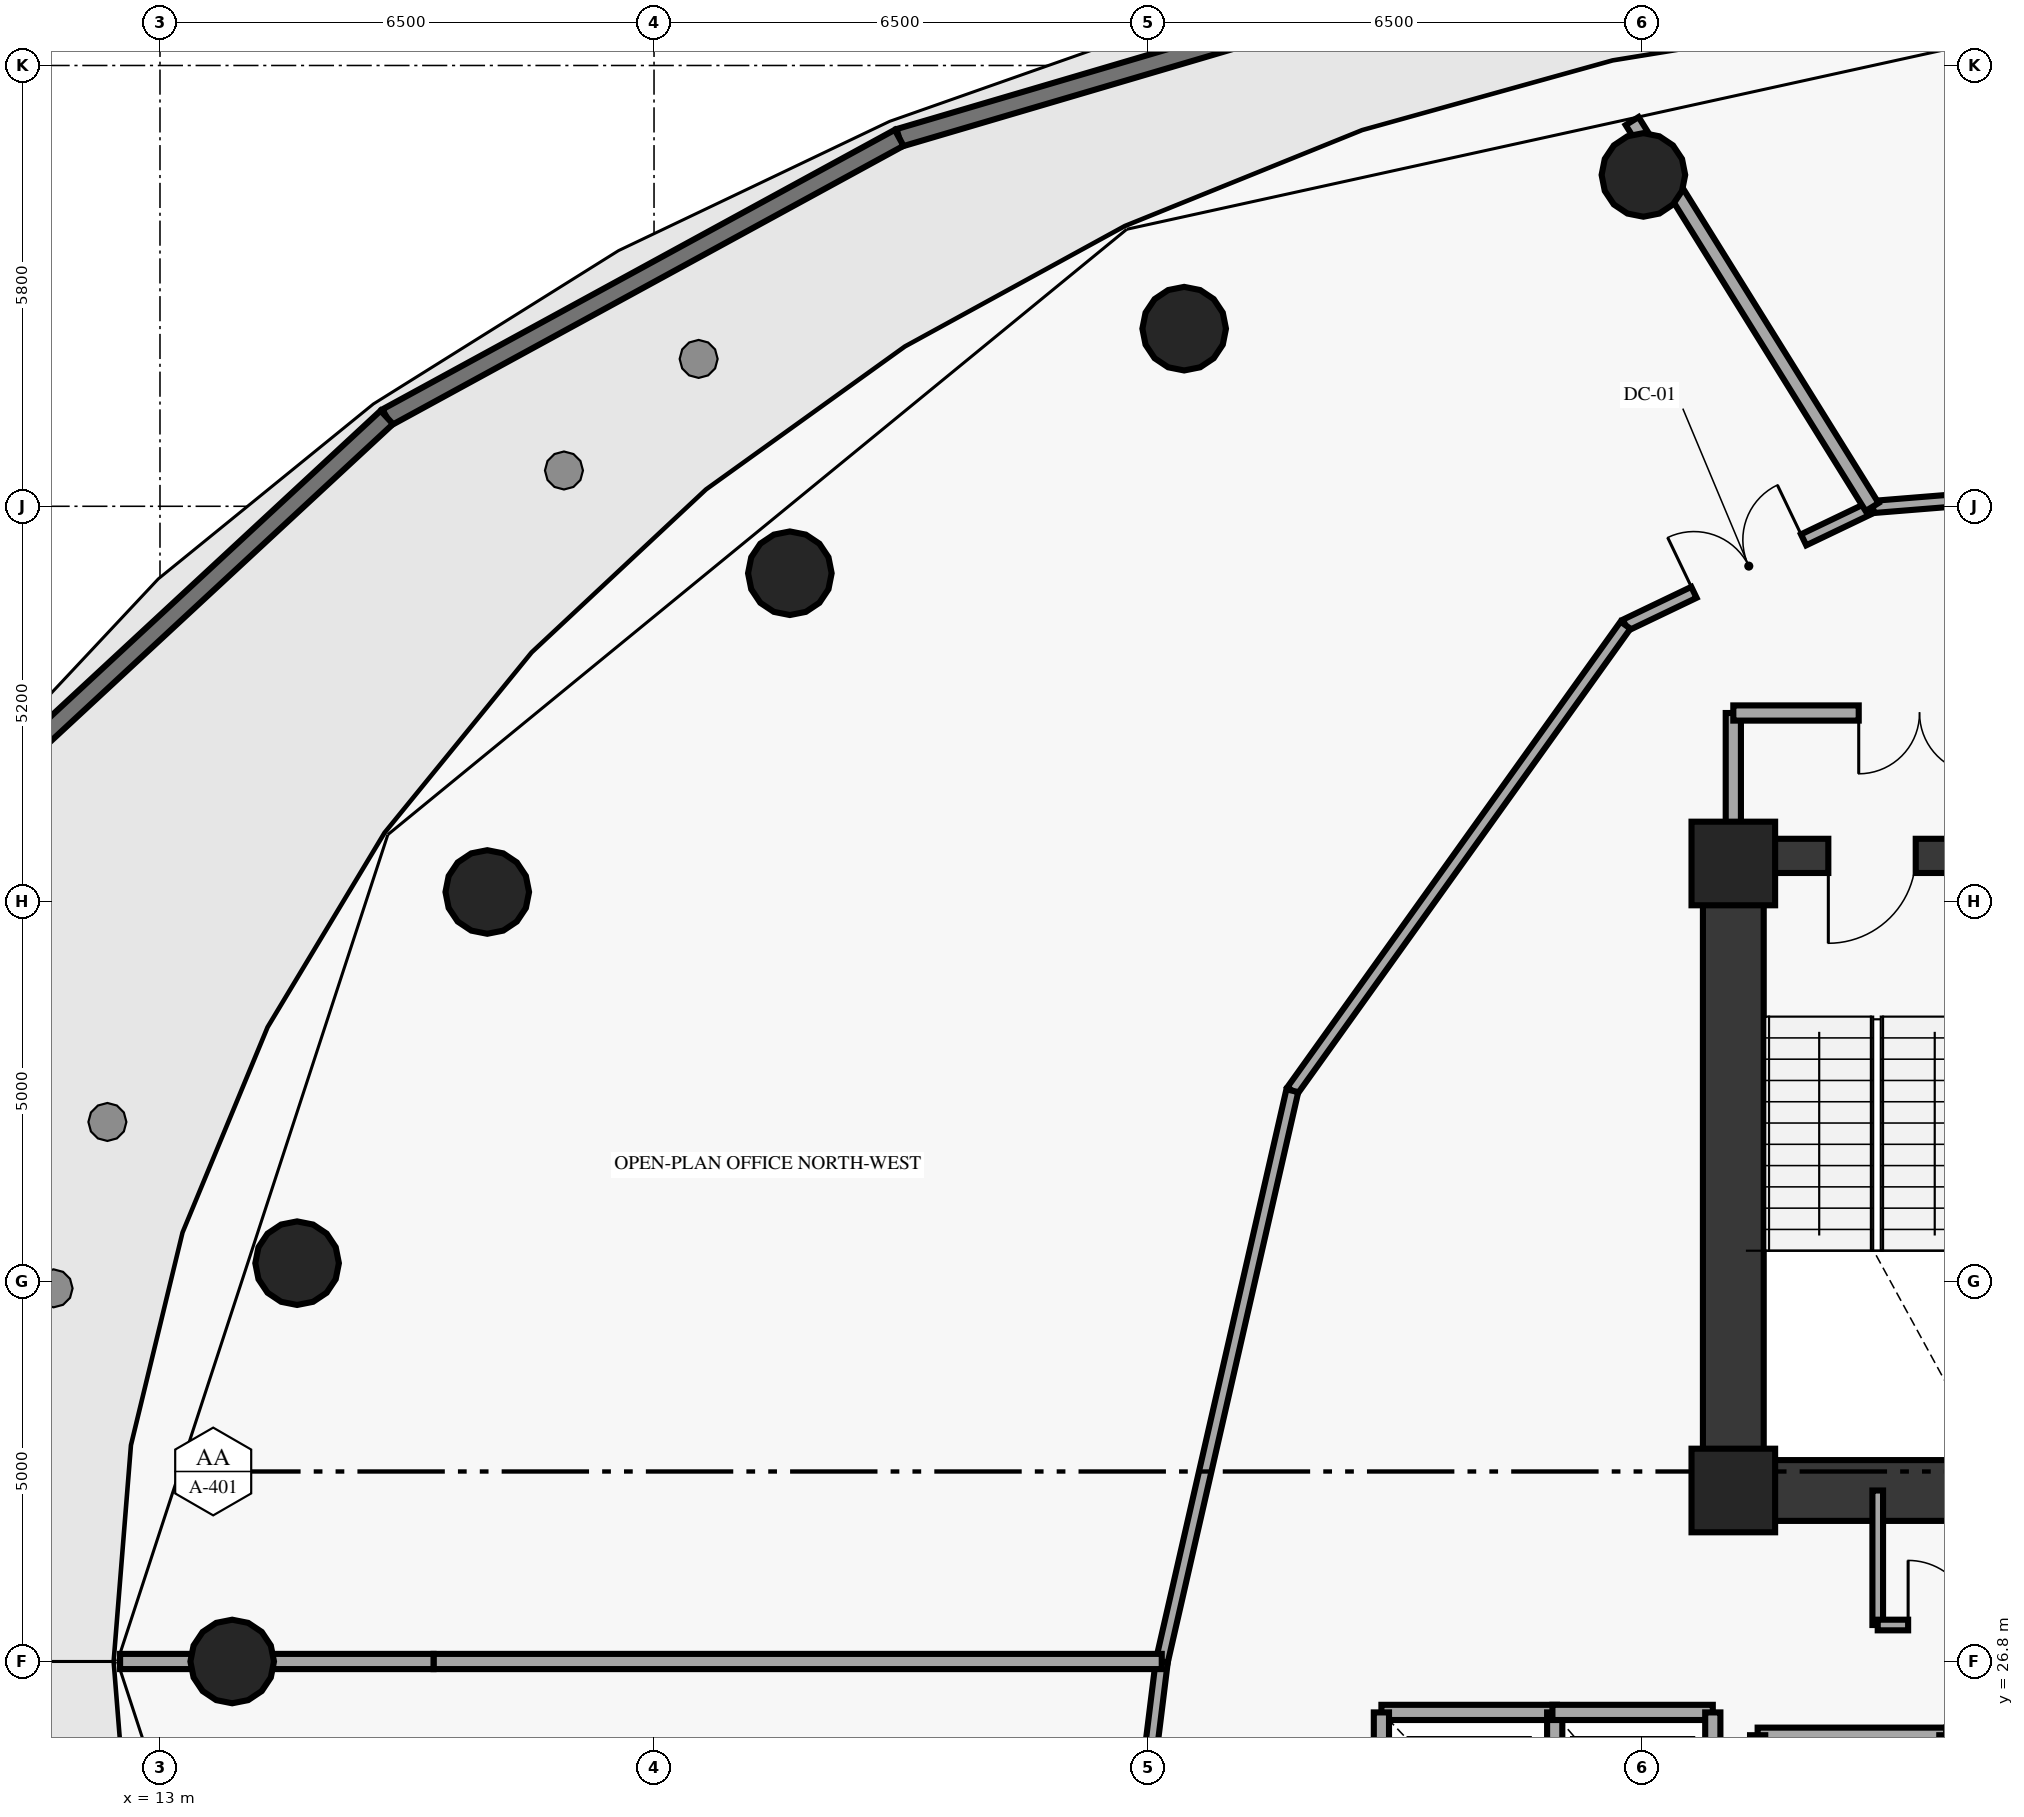
"""IFC4 building model, lengths in metres.
Left out: names, types, materials, properties, quantities, classifications, styles, units other than length and angle.
Written with IfcOpenShell. Run it as: python <this file> out.ifc"""

import sys

from ifc_helpers import new_model, si_unit, direction, frame, frame_2d, origin, origin_2d, place, context, subcontext, project, spatial, rectangle, circle, extrude, element, fill, save


model = new_model("IFC4")
c1 = context("Model", 3, precision=1e-05, world=origin(), true_north=direction((0.0, 1.0)))
c2 = subcontext(c1, "Body", "Model", "MODEL_VIEW")
j1 = project(units=[si_unit("LENGTHUNIT", "METRE"), si_unit("PLANEANGLEUNIT", "RADIAN")], contexts=[c1])
p1 = place(None, origin())
s1 = spatial("IfcSite", under=j1, at=p1, CompositionType="ELEMENT")
p2 = place(p1, origin())
s2 = spatial("IfcBuilding", under=s1, at=p2, CompositionType="ELEMENT")
p3 = place(p2, frame((0.0, 0.0, 21.0)))
s3 = spatial("IfcBuildingStorey", under=s2, at=p3, CompositionType="ELEMENT", Elevation=21.0)
for number, where, z_axis, x_axis in (
    (1, (33.7, 37.3, 0.0), (0.0, 0.0, 1.0), (1.0, 0.0, 0.0)),
    (2, (33.7, 29.05, 0.0), (0.0, 0.0, 1.0), (1.0, 0.0, 0.0)),
):
    element("IfcColumn", number, at=place(p3, frame(where, z_axis=z_axis, x_axis=x_axis)), inside=s3, PredefinedType="PILASTER", context=c2, shape_type="SweptSolid", body=[
        extrude(rectangle(XDim=1.1, YDim=1.1, at=origin_2d()), origin(), (0.0, 0.0, 1.0), 3.79),
    ])
for number, where, z_axis, x_axis in (
    (3, (32.517, 46.36, -0.26), (0.0, 0.0, 1.0), (1.0, 0.0, 0.0)),
    (4, (26.475, 44.337, -0.26), (0.0, 0.0, 1.0), (1.0, 0.0, 0.0)),
):
    element("IfcColumn", number, at=place(p3, frame(where, z_axis=z_axis, x_axis=x_axis)), inside=s3, PredefinedType="COLUMN", context=c2, shape_type="SweptSolid", body=[
        extrude(circle(Radius=0.55, at=origin_2d()), origin(), (0.0, 0.0, 1.0), 4.05),
    ])
p4 = place(p3, frame((21.287, 41.119, 0.0), z_axis=(0.0, 0.0, 1.0), x_axis=(1.0, 0.0, 0.0)))
e5 = element("IfcColumn", 5, at=p4, inside=s3, PredefinedType="COLUMN", context=c2, shape_type="SweptSolid", body=[
    extrude(circle(Radius=0.55, at=origin_2d()), origin(), (0.0, 0.0, 1.0), 3.79),
])
for number, where, z_axis, x_axis in (
    (6, (17.306, 36.925, -0.26), (0.0, 0.0, 1.0), (1.0, 0.0, 0.0)),
    (7, (14.804, 32.041, -0.26), (0.0, 0.0, 1.0), (1.0, 0.0, 0.0)),
):
    element("IfcColumn", number, at=place(p3, frame(where, z_axis=z_axis, x_axis=x_axis)), inside=s3, PredefinedType="COLUMN", context=c2, shape_type="SweptSolid", body=[
        extrude(circle(Radius=0.55, at=origin_2d()), origin(), (0.0, 0.0, 1.0), 4.05),
    ])
p5 = place(p3, frame((13.95, 26.8, 0.0), z_axis=(0.0, 0.0, 1.0), x_axis=(1.0, 0.0, 0.0)))
e8 = element("IfcColumn", 8, at=p5, inside=s3, PredefinedType="COLUMN", context=c2, shape_type="SweptSolid", body=[
    extrude(circle(Radius=0.55, at=origin_2d()), origin(), (0.0, 0.0, 1.0), 3.79),
])
p6 = place(p3, frame((33.7, 29.05, 0.0), z_axis=(0.0, 0.0, 1.0), x_axis=(0.0, 1.0, 0.0)))
e9 = element("IfcWall", 9, at=p6, inside=s3, PredefinedType="SHEAR", context=c2, shape_type="SweptSolid", body=[
    extrude(rectangle(XDim=8.35, YDim=0.8, at=frame_2d((4.175, 0.0))), origin(), (0.0, 0.0, 1.0), 3.79),
])
p7 = place(p3, frame((33.7, 29.05, 0.0), z_axis=(0.0, 0.0, 1.0), x_axis=(1.0, 0.0, 0.0)))
e10 = element("IfcWall", 10, at=p7, inside=s3, PredefinedType="SHEAR", context=c2, shape_type="SweptSolid", body=[
    extrude(rectangle(XDim=10.6, YDim=0.8, at=frame_2d((5.3, 0.0))), origin(), (0.0, 0.0, 1.0), 3.79),
])
p8 = place(p3, frame((30.575, 49.161, 0.0), z_axis=(0.0, 0.0, 1.0), x_axis=(-0.959226195017, -0.282639535085, 0.0)))
e11 = element("IfcWall", 11, at=p8, inside=s3, PredefinedType="PARAPET", context=c2, shape_type="SweptSolid", body=[
    extrude(rectangle(XDim=8.184, YDim=0.24, at=frame_2d((4.092, 0.0))), origin(), (0.0, 0.0, 1.0), 1.15),
])
p9 = place(p3, frame((22.725, 46.848, 0.0), z_axis=(0.0, 0.0, 1.0), x_axis=(-0.877843323355, -0.47894790911, 0.0)))
e12 = element("IfcWall", 12, at=p9, inside=s3, PredefinedType="PARAPET", context=c2, shape_type="SweptSolid", body=[
    extrude(rectangle(XDim=7.679, YDim=0.24, at=frame_2d((3.84, 0.0))), origin(), (0.0, 0.0, 1.0), 1.15),
])
p10 = place(p3, frame((15.984, 43.17, 0.0), z_axis=(0.0, 0.0, 1.0), x_axis=(-0.733389888961, -0.679808260298, 0.0)))
e13 = element("IfcWall", 13, at=p10, inside=s3, PredefinedType="PARAPET", context=c2, shape_type="SweptSolid", body=[
    extrude(rectangle(XDim=7.053, YDim=0.24, at=frame_2d((3.527, 0.0))), origin(), (0.0, 0.0, 1.0), 1.15),
])
p11 = place(p3, frame((37.35, 37.4, 0.0), z_axis=(0.0, 0.0, 1.0), x_axis=(-1.0, 0.0, 0.0)))
e14 = element("IfcWall", 14, at=p11, inside=s3, PredefinedType="SHEAR", context=c2, shape_type="SweptSolid", body=[
    extrude(rectangle(XDim=3.65, YDim=0.45, at=frame_2d((1.825, 0.0))), origin(), (0.0, 0.0, 1.0), 3.79),
])
p12 = place(p11, frame((1.25, 0.0, 0.0)))
e15 = element("IfcOpeningElement", 15, at=p12, cuts=e14, PredefinedType="OPENING", context=c2, shape_type="SweptSolid", body=[
    extrude(rectangle(XDim=1.15, YDim=2.15, at=frame_2d((0.575, 1.075))), frame((0.0, 0.235, 0.0), z_axis=(0.0, -1.0, 0.0), x_axis=(1.0, 0.0, 0.0)), (0.0, 0.0, 1.0), 0.47),
])
p13 = place(p3, frame((33.7, 37.4, 0.0), z_axis=(0.0, 0.0, 1.0), x_axis=(0.0, 1.0, 0.0)))
e16 = element("IfcWall", 16, at=p13, inside=s3, PredefinedType="SOLIDWALL", context=c2, shape_type="SweptSolid", body=[
    extrude(rectangle(XDim=1.88, YDim=0.2, at=frame_2d((0.94, 0.0))), origin(), (0.0, 0.0, 1.0), 3.79),
])
p14 = place(p3, frame((38.9, 39.28, 0.0), z_axis=(0.0, 0.0, 1.0), x_axis=(-1.0, 0.0, 0.0)))
e17 = element("IfcWall", 17, at=p14, inside=s3, PredefinedType="SOLIDWALL", context=c2, shape_type="SweptSolid", body=[
    extrude(rectangle(XDim=5.2, YDim=0.2, at=frame_2d((2.6, 0.0))), origin(), (0.0, 0.0, 1.0), 3.79),
])
p15 = place(p14, frame((1.95, 0.0, 0.0)))
e18 = element("IfcOpeningElement", 18, at=p15, cuts=e17, PredefinedType="OPENING", context=c2, shape_type="SweptSolid", body=[
    extrude(rectangle(XDim=1.6, YDim=2.2, at=frame_2d((0.8, 1.1))), frame((0.0, 0.11, 0.0), z_axis=(0.0, -1.0, 0.0), x_axis=(1.0, 0.0, 0.0)), (0.0, 0.0, 1.0), 0.22),
])
p16 = place(p3, frame((35.6, 27.28, 0.0), z_axis=(0.0, 0.0, 1.0), x_axis=(0.0, 1.0, 0.0)))
e19 = element("IfcWall", 19, at=p16, inside=s3, PredefinedType="PARTITIONING", context=c2, shape_type="SweptSolid", body=[
    extrude(rectangle(XDim=1.77, YDim=0.14, at=frame_2d((0.885, 0.0))), origin(), (0.0, 0.0, 1.0), 3.79),
])
p17 = place(p3, frame((29.07, 26.13, 0.0), z_axis=(0.0, 0.0, 1.0), x_axis=(1.0, 0.0, 0.0)))
e20 = element("IfcWall", 20, at=p17, inside=s3, PredefinedType="SOLIDWALL", context=c2, shape_type="SweptSolid", body=[
    extrude(rectangle(XDim=2.31, YDim=0.2, at=frame_2d((1.155, 0.0))), origin(), (0.0, 0.0, 1.0), 3.79),
])
for number, where, z_axis, x_axis in (
    (21, (29.07, 23.72, 0.0), (0.0, 0.0, 1.0), (0.0, 1.0, 0.0)),
    (22, (31.35, 23.72, 0.0), (0.0, 0.0, 1.0), (0.0, 1.0, 0.0)),
):
    element("IfcWall", number, at=place(p3, frame(where, z_axis=z_axis, x_axis=x_axis)), inside=s3, PredefinedType="SOLIDWALL", context=c2, shape_type="SweptSolid", body=[
        extrude(rectangle(XDim=2.41, YDim=0.2, at=frame_2d((1.205, 0.0))), origin(), (0.0, 0.0, 1.0), 3.79),
    ])
p18 = place(p3, frame((31.32, 26.13, 0.0), z_axis=(0.0, 0.0, 1.0), x_axis=(1.0, 0.0, 0.0)))
e23 = element("IfcWall", 23, at=p18, inside=s3, PredefinedType="SOLIDWALL", context=c2, shape_type="SweptSolid", body=[
    extrude(rectangle(XDim=2.11, YDim=0.2, at=frame_2d((1.055, 0.0))), origin(), (0.0, 0.0, 1.0), 3.79),
])
p19 = place(p3, frame((33.43, 23.72, 0.0), z_axis=(0.0, 0.0, 1.0), x_axis=(0.0, 1.0, 0.0)))
e24 = element("IfcWall", 24, at=p19, inside=s3, PredefinedType="SOLIDWALL", context=c2, shape_type="SweptSolid", body=[
    extrude(rectangle(XDim=2.41, YDim=0.2, at=frame_2d((1.205, 0.0))), origin(), (0.0, 0.0, 1.0), 3.79),
])
p20 = place(p3, frame((34.02, 25.83, 0.0), z_axis=(0.0, 0.0, 1.0), x_axis=(1.0, 0.0, 0.0)))
e25 = element("IfcWall", 25, at=p20, inside=s3, PredefinedType="SOLIDWALL", context=c2, shape_type="SweptSolid", body=[
    extrude(rectangle(XDim=2.5, YDim=0.2, at=frame_2d((1.25, 0.0))), origin(), (0.0, 0.0, 1.0), 3.79),
])
for number, where, z_axis, x_axis in (
    (26, (34.02, 23.42, 0.0), (0.0, 0.0, 1.0), (0.0, 1.0, 0.0)),
    (27, (36.51, 23.42, 0.0), (0.0, 0.0, 1.0), (0.0, 1.0, 0.0)),
):
    element("IfcWall", number, at=place(p3, frame(where, z_axis=z_axis, x_axis=x_axis)), inside=s3, PredefinedType="SOLIDWALL", context=c2, shape_type="SweptSolid", body=[
        extrude(rectangle(XDim=2.41, YDim=0.2, at=frame_2d((1.205, 0.0))), origin(), (0.0, 0.0, 1.0), 3.79),
    ])
p21 = place(p3, frame((35.6, 27.28, 0.0), z_axis=(0.0, 0.0, 1.0), x_axis=(1.0, 0.0, 0.0)))
e28 = element("IfcWall", 28, at=p21, inside=s3, PredefinedType="PARTITIONING", context=c2, shape_type="SweptSolid", body=[
    extrude(rectangle(XDim=5.4, YDim=0.14, at=frame_2d((2.7, 0.0))), origin(), (0.0, 0.0, 1.0), 3.79),
])
p22 = place(p21, frame((0.4, 0.0, 0.0)))
e29 = element("IfcOpeningElement", 29, at=p22, cuts=e28, PredefinedType="OPENING", context=c2, shape_type="SweptSolid", body=[
    extrude(rectangle(XDim=0.85, YDim=2.1, at=frame_2d((0.425, 1.05))), frame((0.0, 0.08, 0.0), z_axis=(0.0, -1.0, 0.0), x_axis=(1.0, 0.0, 0.0)), (0.0, 0.0, 1.0), 0.16),
])
p23 = place(p21, frame((2.25, 0.0, 0.0)))
e30 = element("IfcOpeningElement", 30, at=p23, cuts=e28, PredefinedType="OPENING", context=c2, shape_type="SweptSolid", body=[
    extrude(rectangle(XDim=0.95, YDim=2.1, at=frame_2d((0.475, 1.05))), frame((0.0, 0.08, 0.0), z_axis=(0.0, -1.0, 0.0), x_axis=(1.0, 0.0, 0.0)), (0.0, 0.0, 1.0), 0.16),
])
p24 = place(p21, frame((4.2, 0.0, 0.0)))
e31 = element("IfcOpeningElement", 31, at=p24, cuts=e28, PredefinedType="OPENING", context=c2, shape_type="SweptSolid", body=[
    extrude(rectangle(XDim=0.8, YDim=2.05, at=frame_2d((0.4, 1.025))), frame((0.0, 0.08, 0.0), z_axis=(0.0, -1.0, 0.0), x_axis=(1.0, 0.0, 0.0)), (0.0, 0.0, 1.0), 0.16),
])
p25 = place(p3, frame((39.0, 42.27, 0.0), z_axis=(0.0, 0.0, 1.0), x_axis=(-0.99676721303, -0.080343780277, 0.0)))
e32 = element("IfcWall", 32, at=p25, inside=s3, PredefinedType="PARTITIONING", context=c2, shape_type="SweptSolid", body=[
    extrude(rectangle(XDim=3.485, YDim=0.16, at=frame_2d((1.743, 0.0))), origin(), (0.0, 0.0, 1.0), 3.79),
])
p26 = place(p3, frame((32.281, 40.436, 0.0), z_axis=(0.0, 0.0, 1.0), x_axis=(0.901911315708, 0.43192126435, 0.0)))
e33 = element("IfcWall", 33, at=p26, inside=s3, PredefinedType="PARTITIONING", context=c2, shape_type="SweptSolid", body=[
    extrude(rectangle(XDim=3.598, YDim=0.16, at=frame_2d((1.799, 0.0))), origin(), (0.0, 0.0, 1.0), 3.79),
])
p27 = place(p26, frame((0.999, 0.0, 0.0)))
e34 = element("IfcOpeningElement", 34, at=p27, cuts=e33, PredefinedType="OPENING", context=c2, shape_type="SweptSolid", body=[
    extrude(rectangle(XDim=1.6, YDim=2.2, at=frame_2d((0.8, 1.1))), frame((0.0, 0.09, 0.0), z_axis=(0.0, -1.0, 0.0), x_axis=(1.0, 0.0, 0.0)), (0.0, 0.0, 1.0), 0.18),
])
p28 = place(p3, frame((32.281, 40.436, 0.0), z_axis=(0.0, 0.0, 1.0), x_axis=(-0.581884927471, -0.813271130179, 0.0)))
e35 = element("IfcWall", 35, at=p28, inside=s3, PredefinedType="PARTITIONING", context=c2, shape_type="SweptSolid", body=[
    extrude(rectangle(XDim=7.532, YDim=0.16, at=frame_2d((3.766, 0.0))), origin(), (0.0, 0.0, 1.0), 3.79),
])
p29 = place(p3, frame((27.898, 34.31, 0.0), z_axis=(0.0, 0.0, 1.0), x_axis=(-0.223002916051, -0.974817777553, 0.0)))
e36 = element("IfcWall", 36, at=p29, inside=s3, PredefinedType="PARTITIONING", context=c2, shape_type="SweptSolid", body=[
    extrude(rectangle(XDim=7.704, YDim=0.16, at=frame_2d((3.852, 0.0))), origin(), (0.0, 0.0, 1.0), 3.79),
])
p30 = place(p3, frame((25.663, 22.614, 0.0), z_axis=(0.0, 0.0, 1.0), x_axis=(0.122538537921, 0.992463755874, 0.0)))
e37 = element("IfcWall", 37, at=p30, inside=s3, PredefinedType="PARTITIONING", context=c2, shape_type="SweptSolid", body=[
    extrude(rectangle(XDim=4.218, YDim=0.16, at=frame_2d((2.109, 0.0))), origin(), (0.0, 0.0, 1.0), 3.79),
])
p31 = place(p30, frame((1.634, 0.0, 0.0)))
e38 = element("IfcOpeningElement", 38, at=p31, cuts=e37, PredefinedType="OPENING", context=c2, shape_type="SweptSolid", body=[
    extrude(rectangle(XDim=0.95, YDim=2.15, at=frame_2d((0.475, 1.075))), frame((0.0, 0.09, 0.0), z_axis=(0.0, -1.0, 0.0), x_axis=(1.0, 0.0, 0.0)), (0.0, 0.0, 1.0), 0.18),
])
p32 = place(p3, frame((35.526, 41.99, 0.0), z_axis=(0.0, 0.0, 1.0), x_axis=(-0.527898308029, 0.849307586438, 0.0)))
e39 = element("IfcWall", 39, at=p32, inside=s3, PredefinedType="PARTITIONING", context=c2, shape_type="SweptSolid", body=[
    extrude(rectangle(XDim=5.98, YDim=0.2, at=frame_2d((2.99, 0.0))), origin(), (0.0, 0.0, 1.0), 3.79),
])
p33 = place(p3, frame((26.18, 26.8, 0.0), z_axis=(0.0, 0.0, 1.0), x_axis=(-1.0, 0.0, 0.0)))
e40 = element("IfcWall", 40, at=p33, inside=s3, PredefinedType="PARTITIONING", context=c2, shape_type="SweptSolid", body=[
    extrude(rectangle(XDim=9.581, YDim=0.2, at=frame_2d((4.791, 0.0))), origin(), (0.0, 0.0, 1.0), 3.79),
])
p34 = place(p3, frame((16.599, 26.8, 0.0), z_axis=(0.0, 0.0, 1.0), x_axis=(-1.0, 0.0, 0.0)))
e41 = element("IfcWall", 41, at=p34, inside=s3, PredefinedType="PARTITIONING", context=c2, shape_type="SweptSolid", body=[
    extrude(rectangle(XDim=2.66, YDim=0.2, at=frame_2d((1.33, 0.0))), origin(), (0.0, 0.0, 1.0), 2.78),
])
p35 = place(p3, frame((13.939, 26.8, 0.0), z_axis=(0.0, 0.0, 1.0), x_axis=(-1.0, 0.0, 0.0)))
e42 = element("IfcWall", 42, at=p35, inside=s3, PredefinedType="PARTITIONING", context=c2, shape_type="SweptSolid", body=[
    extrude(rectangle(XDim=1.464, YDim=0.2, at=frame_2d((0.732, 0.0))), origin(), (0.0, 0.0, 1.0), 3.79),
])
p36 = place(p12, origin())
e43 = element("IfcDoor", 43, at=p36, inside=s3, OperationType="SINGLE_SWING_RIGHT", PredefinedType="DOOR", context=c2, shape_type="SweptSolid", body=[
    extrude(rectangle(XDim=1.15, YDim=2.15, at=frame_2d((0.575, 1.075))), frame((0.0, 0.025, 0.0), z_axis=(0.0, -1.0, 0.0), x_axis=(1.0, 0.0, 0.0)), (0.0, 0.0, 1.0), 0.05),
])
fill(e15, e43)
p37 = place(p15, origin())
e44 = element("IfcDoor", 44, at=p37, inside=s3, OperationType="DOUBLE_DOOR_SINGLE_SWING", PredefinedType="DOOR", context=c2, shape_type="SweptSolid", body=[
    extrude(rectangle(XDim=1.6, YDim=2.2, at=frame_2d((0.8, 1.1))), frame((0.0, 0.025, 0.0), z_axis=(0.0, -1.0, 0.0), x_axis=(1.0, 0.0, 0.0)), (0.0, 0.0, 1.0), 0.05),
])
fill(e18, e44)
p38 = place(p22, origin())
e45 = element("IfcDoor", 45, at=p38, inside=s3, OperationType="SINGLE_SWING_LEFT", PredefinedType="DOOR", context=c2, shape_type="SweptSolid", body=[
    extrude(rectangle(XDim=0.85, YDim=2.1, at=frame_2d((0.425, 1.05))), frame((0.0, 0.025, 0.0), z_axis=(0.0, -1.0, 0.0), x_axis=(1.0, 0.0, 0.0)), (0.0, 0.0, 1.0), 0.05),
])
fill(e29, e45)
p39 = place(p27, origin())
e46 = element("IfcDoor", 46, at=p39, inside=s3, OperationType="DOUBLE_DOOR_SINGLE_SWING", PredefinedType="DOOR", context=c2, shape_type="SweptSolid", body=[
    extrude(rectangle(XDim=1.6, YDim=2.2, at=frame_2d((0.8, 1.1))), frame((0.0, 0.025, 0.0), z_axis=(0.0, -1.0, 0.0), x_axis=(1.0, 0.0, 0.0)), (0.0, 0.0, 1.0), 0.05),
])
fill(e34, e46)
save(model, sys.argv[1])
